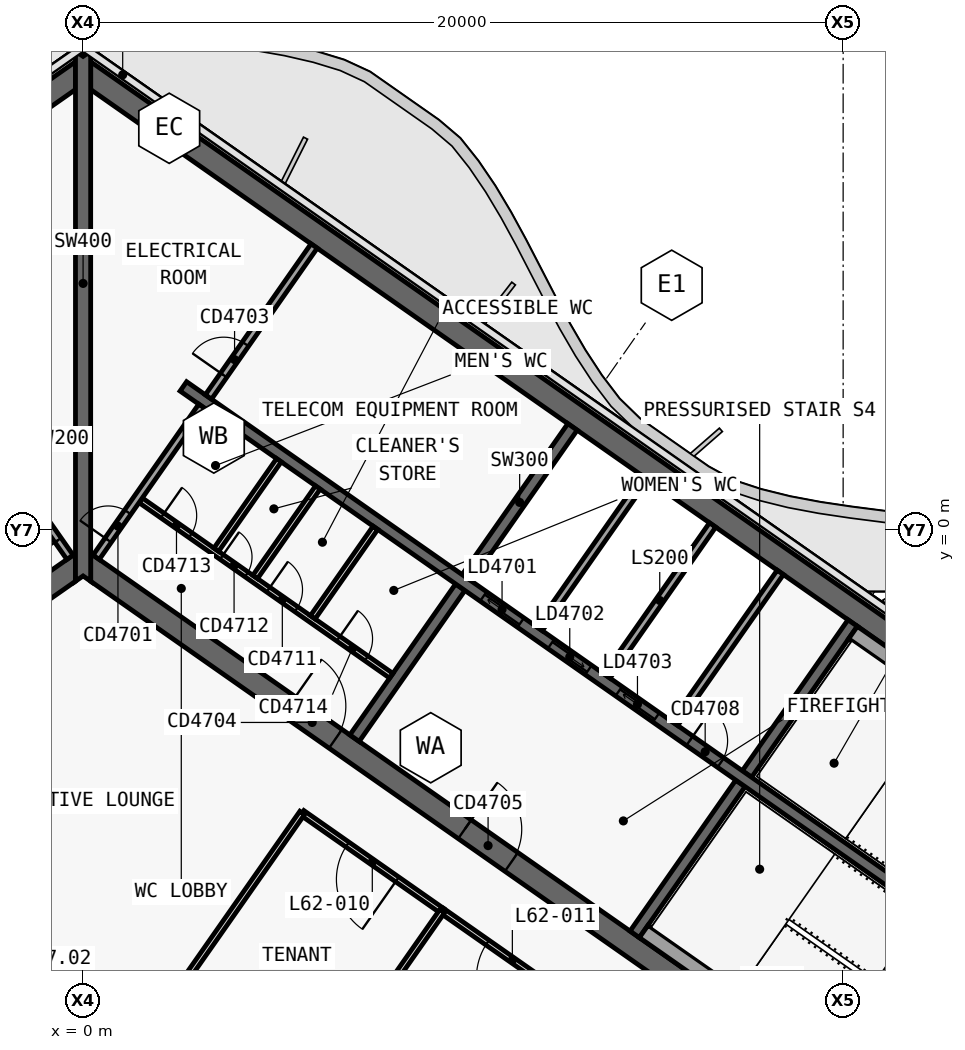
"""IFC4 building model, lengths in metres.
Left out: names, types, materials, properties, quantities, classifications, styles, units other than length and angle.
Written with IfcOpenShell. Run it as: python <this file> out.ifc"""

import sys

from ifc_helpers import new_model, si_unit, direction, frame, frame_2d, origin, place, context, subcontext, project, spatial, polyline, rectangle, outline, extrude, element, fill, save


model = new_model("IFC4")
c1 = context("Model", 3, precision=1e-05, world=origin(), true_north=direction((0.0, 1.0)))
c2 = subcontext(c1, "Body", "Model", "MODEL_VIEW")
j1 = project(units=[si_unit("LENGTHUNIT", "METRE"), si_unit("PLANEANGLEUNIT", "RADIAN")], contexts=[c1])
p1 = place(None, origin())
s1 = spatial("IfcSite", under=j1, at=p1, CompositionType="ELEMENT")
p2 = place(p1, origin())
s2 = spatial("IfcBuilding", under=s1, at=p2, CompositionType="ELEMENT")
p3 = place(p2, frame((0.0, 0.0, 264.4)))
s3 = spatial("IfcBuildingStorey", under=s2, at=p3, CompositionType="ELEMENT", Elevation=264.4)
p4 = place(p3, frame((-0.028, 12.066, 0.0), z_axis=(0.0, 0.0, 1.0), x_axis=(-0.819151382952, -0.573577380837, 0.0)))
e1 = element("IfcWall", 1, at=p4, inside=s3, PredefinedType="SHEAR", context=c2, shape_type="SweptSolid", body=[
    extrude(outline(polyline([(33.898, 0.3), (0.42, 0.3), (0.0, -0.3), (33.898, -0.3), (33.898, 0.3)])), origin(), (0.0, 0.0, 1.0), 3.9),
])
p5 = place(p3, frame((-0.028, -0.874, 0.0), z_axis=(0.0, 0.0, 1.0), x_axis=(-0.819150035022, -0.573579305871, 0.0)))
e2 = element("IfcWall", 2, at=p5, inside=s3, PredefinedType="SHEAR", context=c2, shape_type="SweptSolid", body=[
    extrude(outline(polyline([(26.476, 0.3), (0.42, 0.3), (0.0, -0.3), (26.476, -0.3), (26.476, 0.3)])), origin(), (0.0, 0.0, 1.0), 3.9),
])
p6 = place(p5, frame((2.976, 0.0, 0.0)))
e3 = element("IfcOpeningElement", 3, at=p6, cuts=e2, PredefinedType="OPENING", context=c2, shape_type="SweptSolid", body=[
    extrude(rectangle(XDim=2.4, YDim=2.1, at=frame_2d((1.2, 1.05))), frame((0.0, 0.31, 0.0), z_axis=(0.0, -1.0, 0.0), x_axis=(1.0, 0.0, 0.0)), (0.0, 0.0, 1.0), 0.62),
])
p7 = place(p5, frame((11.776, 0.0, 0.0)))
e4 = element("IfcOpeningElement", 4, at=p7, cuts=e2, PredefinedType="OPENING", context=c2, shape_type="SweptSolid", body=[
    extrude(rectangle(XDim=2.4, YDim=2.1, at=frame_2d((1.2, 1.05))), frame((0.0, 0.31, 0.0), z_axis=(0.0, -1.0, 0.0), x_axis=(1.0, 0.0, 0.0)), (0.0, 0.0, 1.0), 0.62),
])
p8 = place(p3, frame((0.028, 12.066, 0.0), z_axis=(0.0, 0.0, 1.0), x_axis=(0.819151382952, -0.573577380837, 0.0)))
e5 = element("IfcWall", 5, at=p8, inside=s3, PredefinedType="SHEAR", context=c2, shape_type="SweptSolid", body=[
    extrude(outline(polyline([(33.898, 0.3), (0.0, 0.3), (0.42, -0.3), (33.898, -0.3), (33.898, 0.3)])), origin(), (0.0, 0.0, 1.0), 3.9),
])
p9 = place(p3, frame((0.028, -0.874, 0.0), z_axis=(0.0, 0.0, 1.0), x_axis=(0.819150035022, -0.573579305871, 0.0)))
e6 = element("IfcWall", 6, at=p9, inside=s3, PredefinedType="SHEAR", context=c2, shape_type="SweptSolid", body=[
    extrude(outline(polyline([(26.476, 0.3), (0.0, 0.3), (0.42, -0.3), (26.476, -0.3), (26.476, 0.3)])), origin(), (0.0, 0.0, 1.0), 3.9),
])
p10 = place(p9, frame((6.576, 0.0, 0.0)))
e7 = element("IfcOpeningElement", 7, at=p10, cuts=e6, PredefinedType="OPENING", context=c2, shape_type="SweptSolid", body=[
    extrude(rectangle(XDim=1.5, YDim=2.1, at=frame_2d((0.75, 1.05))), frame((0.0, 0.31, 0.0), z_axis=(0.0, -1.0, 0.0), x_axis=(1.0, 0.0, 0.0)), (0.0, 0.0, 1.0), 0.62),
])
p11 = place(p9, frame((12.226, 0.0, 0.0)))
e8 = element("IfcOpeningElement", 8, at=p11, cuts=e6, PredefinedType="OPENING", context=c2, shape_type="SweptSolid", body=[
    extrude(rectangle(XDim=1.5, YDim=2.1, at=frame_2d((0.75, 1.05))), frame((0.0, 0.31, 0.0), z_axis=(0.0, -1.0, 0.0), x_axis=(1.0, 0.0, 0.0)), (0.0, 0.0, 1.0), 0.62),
])
p12 = place(p3, frame((7.143, -5.49, 0.0), z_axis=(0.0, 0.0, 1.0), x_axis=(0.573617744349, 0.819123118565, 0.0)))
e9 = element("IfcWall", 9, at=p12, inside=s3, PredefinedType="SHEAR", context=c2, shape_type="SweptSolid", body=[
    extrude(outline(polyline([(0.0, 0.15), (0.0, -0.15), (4.85, -0.15), (4.85, 0.15), (0.0, 0.15)])), origin(), (0.0, 0.0, 1.0), 3.9),
])
p13 = place(p3, frame((10.097, -1.271, 0.0), z_axis=(0.0, 0.0, 1.0), x_axis=(0.573560315113, 0.819163332265, 0.0)))
e10 = element("IfcWall", 10, at=p13, inside=s3, PredefinedType="SHEAR", context=c2, shape_type="SweptSolid", body=[
    extrude(outline(polyline([(4.85, -0.15), (4.85, 0.15), (0.0, 0.15), (0.0, -0.15), (4.85, -0.15)])), origin(), (0.0, 0.0, 1.0), 3.9),
])
p14 = place(p3, frame((14.515, -10.652, 0.0), z_axis=(0.0, 0.0, 1.0), x_axis=(0.573560315113, 0.819163332265, 0.0)))
e11 = element("IfcWall", 11, at=p14, inside=s3, PredefinedType="SHEAR", context=c2, shape_type="SweptSolid", body=[
    extrude(outline(polyline([(0.0, 0.15), (0.0, -0.15), (4.85, -0.15), (4.85, 0.15), (0.0, 0.15)])), origin(), (0.0, 0.0, 1.0), 3.9),
])
p15 = place(p3, frame((17.469, -6.433, 0.0), z_axis=(0.0, 0.0, 1.0), x_axis=(0.573594092424, 0.81913968109, 0.0)))
e12 = element("IfcWall", 12, at=p15, inside=s3, PredefinedType="SHEAR", context=c2, shape_type="SweptSolid", body=[
    extrude(outline(polyline([(4.85, -0.15), (4.85, 0.15), (0.0, 0.15), (0.0, -0.15), (4.85, -0.15)])), origin(), (0.0, 0.0, 1.0), 3.9),
])
p16 = place(p3, frame((2.638, 3.768, 0.0), z_axis=(0.0, 0.0, 1.0), x_axis=(0.819155014212, -0.573572194837, 0.0)))
e13 = element("IfcWall", 13, at=p16, inside=s3, PredefinedType="SHEAR", context=c2, shape_type="SweptSolid", body=[
    extrude(outline(polyline([(0.0, 0.15), (0.0, -0.15), (26.4, -0.15), (26.4, 0.15), (0.0, 0.15)])), origin(), (0.0, 0.0, 1.0), 3.9),
])
p17 = place(p16, frame((9.637, 0.0, 0.0)))
e14 = element("IfcOpeningElement", 14, at=p17, cuts=e13, PredefinedType="OPENING", context=c2, shape_type="SweptSolid", body=[
    extrude(rectangle(XDim=1.2, YDim=2.1, at=frame_2d((0.6, 1.05))), frame((0.0, 0.16, 0.0), z_axis=(0.0, -1.0, 0.0), x_axis=(1.0, 0.0, 0.0)), (0.0, 0.0, 1.0), 0.32),
])
p18 = place(p16, frame((11.812, 0.0, 0.0)))
e15 = element("IfcOpeningElement", 15, at=p18, cuts=e13, PredefinedType="OPENING", context=c2, shape_type="SweptSolid", body=[
    extrude(rectangle(XDim=1.2, YDim=2.1, at=frame_2d((0.6, 1.05))), frame((0.0, 0.16, 0.0), z_axis=(0.0, -1.0, 0.0), x_axis=(1.0, 0.0, 0.0)), (0.0, 0.0, 1.0), 0.32),
])
p19 = place(p16, frame((13.988, 0.0, 0.0)))
e16 = element("IfcOpeningElement", 16, at=p19, cuts=e13, PredefinedType="OPENING", context=c2, shape_type="SweptSolid", body=[
    extrude(rectangle(XDim=1.2, YDim=2.1, at=frame_2d((0.6, 1.05))), frame((0.0, 0.16, 0.0), z_axis=(0.0, -1.0, 0.0), x_axis=(1.0, 0.0, 0.0)), (0.0, 0.0, 1.0), 0.32),
])
p20 = place(p16, frame((16.262, 0.0, 0.0)))
e17 = element("IfcOpeningElement", 17, at=p20, cuts=e13, PredefinedType="OPENING", context=c2, shape_type="SweptSolid", body=[
    extrude(rectangle(XDim=1.0, YDim=2.1, at=frame_2d((0.5, 1.05))), frame((0.0, 0.16, 0.0), z_axis=(0.0, -1.0, 0.0), x_axis=(1.0, 0.0, 0.0)), (0.0, 0.0, 1.0), 0.32),
])
p21 = place(p3, frame((0.0, -1.361, 0.0), z_axis=(0.0, 0.0, 1.0), x_axis=(0.0, 1.0, 0.0)))
e18 = element("IfcWall", 18, at=p21, inside=s3, PredefinedType="SHEAR", context=c2, shape_type="SweptSolid", body=[
    extrude(outline(polyline([(0.14, 0.2), (0.0, 0.2), (0.14, 0.0), (0.0, -0.2), (0.14, -0.2), (1.012, -0.2), (12.94, -0.2), (13.813, -0.2), (13.893, -0.2), (13.933, -0.172), (13.813, 0.0), (13.933, 0.172), (13.893, 0.2), (13.813, 0.2), (12.94, 0.2), (1.012, 0.2), (0.14, 0.2)])), origin(), (0.0, 0.0, 1.0), 3.9),
])
p22 = place(p3, frame((12.001, -2.605, 0.0), z_axis=(0.0, 0.0, 1.0), x_axis=(0.573560315113, 0.819163332265, 0.0)))
e19 = element("IfcWall", 19, at=p22, inside=s3, PredefinedType="SOLIDWALL", context=c2, shape_type="SweptSolid", body=[
    extrude(rectangle(XDim=4.85, YDim=0.2, at=frame_2d((2.425, 0.0))), origin(), (0.0, 0.0, 1.0), 3.9),
])
p23 = place(p3, frame((13.783, -3.852, 0.0), z_axis=(0.0, 0.0, 1.0), x_axis=(0.573594092424, 0.81913968109, 0.0)))
e20 = element("IfcWall", 20, at=p23, inside=s3, PredefinedType="SOLIDWALL", context=c2, shape_type="SweptSolid", body=[
    extrude(rectangle(XDim=4.85, YDim=0.2, at=frame_2d((2.425, 0.0))), origin(), (0.0, 0.0, 1.0), 3.9),
])
p24 = place(p3, frame((15.565, -5.1, 0.0), z_axis=(0.0, 0.0, 1.0), x_axis=(0.573560315113, 0.819163332265, 0.0)))
e21 = element("IfcWall", 21, at=p24, inside=s3, PredefinedType="SOLIDWALL", context=c2, shape_type="SweptSolid", body=[
    extrude(rectangle(XDim=4.85, YDim=0.2, at=frame_2d((2.425, 0.0))), origin(), (0.0, 0.0, 1.0), 3.9),
])
p25 = place(p3, frame((1.516, 0.77, 0.0), z_axis=(0.0, 0.0, 1.0), x_axis=(0.819146424436, -0.573584462249, 0.0)))
e22 = element("IfcWall", 22, at=p25, inside=s3, PredefinedType="PARTITIONING", context=c2, shape_type="SweptSolid", body=[
    extrude(rectangle(XDim=8.05, YDim=0.15, at=frame_2d((4.025, 0.0))), origin(), (0.0, 0.0, 1.0), 3.62),
])
p26 = place(p25, frame((0.7, 0.0, 0.0)))
e23 = element("IfcOpeningElement", 23, at=p26, cuts=e22, PredefinedType="OPENING", context=c2, shape_type="SweptSolid", body=[
    extrude(rectangle(XDim=0.9, YDim=2.1, at=frame_2d((0.45, 1.05))), frame((0.0, 0.085, 0.0), z_axis=(0.0, -1.0, 0.0), x_axis=(1.0, 0.0, 0.0)), (0.0, 0.0, 1.0), 0.17),
])
p27 = place(p25, frame((2.6, 0.0, 0.0)))
e24 = element("IfcOpeningElement", 24, at=p27, cuts=e22, PredefinedType="OPENING", context=c2, shape_type="SweptSolid", body=[
    extrude(rectangle(XDim=0.8, YDim=2.1, at=frame_2d((0.4, 1.05))), frame((0.0, 0.085, 0.0), z_axis=(0.0, -1.0, 0.0), x_axis=(1.0, 0.0, 0.0)), (0.0, 0.0, 1.0), 0.17),
])
p28 = place(p25, frame((4.1, 0.0, 0.0)))
e25 = element("IfcOpeningElement", 25, at=p28, cuts=e22, PredefinedType="OPENING", context=c2, shape_type="SweptSolid", body=[
    extrude(rectangle(XDim=0.9, YDim=2.1, at=frame_2d((0.45, 1.05))), frame((0.0, 0.085, 0.0), z_axis=(0.0, -1.0, 0.0), x_axis=(1.0, 0.0, 0.0)), (0.0, 0.0, 1.0), 0.17),
])
p29 = place(p25, frame((6.35, 0.0, 0.0)))
e26 = element("IfcOpeningElement", 26, at=p29, cuts=e22, PredefinedType="OPENING", context=c2, shape_type="SweptSolid", body=[
    extrude(rectangle(XDim=0.9, YDim=2.1, at=frame_2d((0.45, 1.05))), frame((0.0, 0.085, 0.0), z_axis=(0.0, -1.0, 0.0), x_axis=(1.0, 0.0, 0.0)), (0.0, 0.0, 1.0), 0.17),
])
p30 = place(p3, frame((3.504, -0.531, 0.0), z_axis=(0.0, 0.0, 1.0), x_axis=(0.573582013179, 0.819148139324, 0.0)))
e27 = element("IfcWall", 27, at=p30, inside=s3, PredefinedType="PARTITIONING", context=c2, shape_type="SweptSolid", body=[
    extrude(rectangle(XDim=2.875, YDim=0.15, at=frame_2d((1.438, 0.0))), origin(), (0.0, 0.0, 1.0), 3.62),
])
p31 = place(p3, frame((4.528, -1.248, 0.0), z_axis=(0.0, 0.0, 1.0), x_axis=(0.573621911162, 0.819120200602, 0.0)))
e28 = element("IfcWall", 28, at=p31, inside=s3, PredefinedType="PARTITIONING", context=c2, shape_type="SweptSolid", body=[
    extrude(rectangle(XDim=2.875, YDim=0.15, at=frame_2d((1.438, 0.0))), origin(), (0.0, 0.0, 1.0), 3.62),
])
p32 = place(p3, frame((6.044, -2.309, 0.0), z_axis=(0.0, 0.0, 1.0), x_axis=(0.573564930514, 0.819160100642, 0.0)))
e29 = element("IfcWall", 29, at=p32, inside=s3, PredefinedType="PARTITIONING", context=c2, shape_type="SweptSolid", body=[
    extrude(rectangle(XDim=2.875, YDim=0.15, at=frame_2d((1.438, 0.0))), origin(), (0.0, 0.0, 1.0), 3.62),
])
p33 = place(p3, frame((20.259, -2.71, 0.0), z_axis=(0.0, 0.0, 1.0), x_axis=(0.81914849389, -0.573581506813, 0.0)))
e30 = element("IfcWall", 30, at=p33, inside=s3, PredefinedType="SOLIDWALL", context=c2, shape_type="SweptSolid", body=[
    extrude(rectangle(XDim=8.25, YDim=0.4, at=frame_2d((4.125, 0.0))), origin(), (0.0, 0.0, 1.0), 3.62),
])
p34 = place(p3, frame((14.753, -10.574, 0.0), z_axis=(0.0, 0.0, 1.0), x_axis=(0.819158229677, -0.573567602601, 0.0)))
e31 = element("IfcWall", 31, at=p34, inside=s3, PredefinedType="SOLIDWALL", context=c2, shape_type="SweptSolid", body=[
    extrude(rectangle(XDim=8.25, YDim=0.4, at=frame_2d((4.125, 0.0))), origin(), (0.0, 0.0, 1.0), 3.62),
])
p35 = place(p3, frame((-0.344, -0.729, 0.0), z_axis=(0.0, 0.0, 1.0), x_axis=(-0.573560315113, 0.819163332265, 0.0)))
e32 = element("IfcWall", 32, at=p35, inside=s3, PredefinedType="SOLIDWALL", context=c2, shape_type="SweptSolid", body=[
    extrude(rectangle(XDim=4.85, YDim=0.2, at=frame_2d((2.425, 0.0))), origin(), (0.0, 0.0, 1.0), 3.62),
])
p36 = place(p35, frame((0.55, 0.0, 0.0)))
e33 = element("IfcOpeningElement", 33, at=p36, cuts=e32, PredefinedType="OPENING", context=c2, shape_type="SweptSolid", body=[
    extrude(rectangle(XDim=0.9, YDim=2.1, at=frame_2d((0.45, 1.05))), frame((0.0, 0.11, 0.0), z_axis=(0.0, -1.0, 0.0), x_axis=(1.0, 0.0, 0.0)), (0.0, 0.0, 1.0), 0.22),
])
p37 = place(p3, frame((0.344, -0.729, 0.0), z_axis=(0.0, 0.0, 1.0), x_axis=(0.573560315113, 0.819163332265, 0.0)))
e34 = element("IfcWall", 34, at=p37, inside=s3, PredefinedType="SOLIDWALL", context=c2, shape_type="SweptSolid", body=[
    extrude(rectangle(XDim=4.85, YDim=0.2, at=frame_2d((2.425, 0.0))), origin(), (0.0, 0.0, 1.0), 3.62),
])
p38 = place(p37, frame((0.55, 0.0, 0.0)))
e35 = element("IfcOpeningElement", 35, at=p38, cuts=e34, PredefinedType="OPENING", context=c2, shape_type="SweptSolid", body=[
    extrude(rectangle(XDim=0.9, YDim=2.1, at=frame_2d((0.45, 1.05))), frame((0.0, 0.11, 0.0), z_axis=(0.0, -1.0, 0.0), x_axis=(1.0, 0.0, 0.0)), (0.0, 0.0, 1.0), 0.22),
])
p39 = place(p3, frame((3.298, 3.49, 0.0), z_axis=(0.0, 0.0, 1.0), x_axis=(0.573560315113, 0.819163332265, 0.0)))
e36 = element("IfcWall", 36, at=p39, inside=s3, PredefinedType="SOLIDWALL", context=c2, shape_type="SweptSolid", body=[
    extrude(rectangle(XDim=4.85, YDim=0.2, at=frame_2d((2.425, 0.0))), origin(), (0.0, 0.0, 1.0), 3.62),
])
p40 = place(p39, frame((0.7, 0.0, 0.0)))
e37 = element("IfcOpeningElement", 37, at=p40, cuts=e36, PredefinedType="OPENING", context=c2, shape_type="SweptSolid", body=[
    extrude(rectangle(XDim=1.0, YDim=2.1, at=frame_2d((0.5, 1.05))), frame((0.0, 0.11, 0.0), z_axis=(0.0, -1.0, 0.0), x_axis=(1.0, 0.0, 0.0)), (0.0, 0.0, 1.0), 0.22),
])
p41 = place(p3, frame((9.454, -10.038, 0.0), z_axis=(0.0, 0.0, 1.0), x_axis=(-0.819142740634, 0.573589723117, 0.0)))
e38 = element("IfcWall", 38, at=p41, inside=s3, PredefinedType="PARTITIONING", context=c2, shape_type="SweptSolid", body=[
    extrude(rectangle(XDim=4.502, YDim=0.15, at=frame_2d((2.251, 0.0))), origin(), (0.0, 0.0, 1.0), 3.05),
])
p42 = place(p41, frame((1.451, 0.0, 0.0)))
e39 = element("IfcOpeningElement", 39, at=p42, cuts=e38, PredefinedType="OPENING", context=c2, shape_type="SweptSolid", body=[
    extrude(rectangle(XDim=1.6, YDim=2.1, at=frame_2d((0.8, 1.05))), frame((0.0, 0.085, 0.0), z_axis=(0.0, -1.0, 0.0), x_axis=(1.0, 0.0, 0.0)), (0.0, 0.0, 1.0), 0.17),
])
p43 = place(p3, frame((13.14, -12.619, 0.0), z_axis=(0.0, 0.0, 1.0), x_axis=(-0.819165703328, 0.573556928727, 0.0)))
e40 = element("IfcWall", 40, at=p43, inside=s3, PredefinedType="PARTITIONING", context=c2, shape_type="SweptSolid", body=[
    extrude(rectangle(XDim=4.504, YDim=0.15, at=frame_2d((2.252, 0.0))), origin(), (0.0, 0.0, 1.0), 3.05),
])
p44 = place(p43, frame((1.452, 0.0, 0.0)))
e41 = element("IfcOpeningElement", 41, at=p44, cuts=e40, PredefinedType="OPENING", context=c2, shape_type="SweptSolid", body=[
    extrude(rectangle(XDim=1.6, YDim=2.1, at=frame_2d((0.8, 1.05))), frame((0.0, 0.085, 0.0), z_axis=(0.0, -1.0, 0.0), x_axis=(1.0, 0.0, 0.0)), (0.0, 0.0, 1.0), 0.17),
])
p45 = place(p3, frame((9.452, -10.037, 0.0), z_axis=(0.0, 0.0, 1.0), x_axis=(-0.573575945067, -0.81915238829, 0.0)))
e42 = element("IfcWall", 42, at=p45, inside=s3, PredefinedType="PARTITIONING", context=c2, shape_type="SweptSolid", body=[
    extrude(rectangle(XDim=7.5, YDim=0.15, at=frame_2d((3.75, 0.0))), origin(), (0.0, 0.0, 1.0), 3.0),
])
p46 = place(p3, frame((1.849, -13.051, 0.0), z_axis=(0.0, 0.0, 1.0), x_axis=(0.573577493031, 0.819151304393, 0.0)))
e43 = element("IfcWall", 43, at=p46, inside=s3, PredefinedType="PARTITIONING", context=c2, shape_type="SweptSolid", body=[
    extrude(rectangle(XDim=6.83, YDim=0.15, at=frame_2d((3.415, 0.0))), origin(), (0.0, 0.0, 1.0), 3.05),
])
p47 = place(p17, origin())
e44 = element("IfcDoor", 44, at=p47, inside=s3, OperationType="SLIDING_TO_LEFT", PredefinedType="DOOR", context=c2, shape_type="SweptSolid", body=[
    extrude(rectangle(XDim=1.2, YDim=2.1, at=frame_2d((0.6, 1.05))), frame((0.0, 0.025, 0.0), z_axis=(0.0, -1.0, 0.0), x_axis=(1.0, 0.0, 0.0)), (0.0, 0.0, 1.0), 0.05),
])
fill(e14, e44)
p48 = place(p18, origin())
e45 = element("IfcDoor", 45, at=p48, inside=s3, OperationType="SLIDING_TO_RIGHT", PredefinedType="DOOR", context=c2, shape_type="SweptSolid", body=[
    extrude(rectangle(XDim=1.2, YDim=2.1, at=frame_2d((0.6, 1.05))), frame((0.0, 0.025, 0.0), z_axis=(0.0, -1.0, 0.0), x_axis=(1.0, 0.0, 0.0)), (0.0, 0.0, 1.0), 0.05),
])
fill(e15, e45)
p49 = place(p19, origin())
e46 = element("IfcDoor", 46, at=p49, inside=s3, OperationType="SLIDING_TO_LEFT", PredefinedType="DOOR", context=c2, shape_type="SweptSolid", body=[
    extrude(rectangle(XDim=1.2, YDim=2.1, at=frame_2d((0.6, 1.05))), frame((0.0, 0.025, 0.0), z_axis=(0.0, -1.0, 0.0), x_axis=(1.0, 0.0, 0.0)), (0.0, 0.0, 1.0), 0.05),
])
fill(e16, e46)
p50 = place(p20, origin())
e47 = element("IfcDoor", 47, at=p50, inside=s3, OperationType="SINGLE_SWING_RIGHT", PredefinedType="DOOR", context=c2, shape_type="SweptSolid", body=[
    extrude(rectangle(XDim=1.0, YDim=2.1, at=frame_2d((0.5, 1.05))), frame((0.0, 0.025, 0.0), z_axis=(0.0, -1.0, 0.0), x_axis=(1.0, 0.0, 0.0)), (0.0, 0.0, 1.0), 0.05),
])
fill(e17, e47)
p51 = place(p26, origin())
e48 = element("IfcDoor", 48, at=p51, inside=s3, OperationType="SINGLE_SWING_RIGHT", PredefinedType="DOOR", context=c2, shape_type="SweptSolid", body=[
    extrude(rectangle(XDim=0.9, YDim=2.1, at=frame_2d((0.45, 1.05))), frame((0.0, 0.025, 0.0), z_axis=(0.0, -1.0, 0.0), x_axis=(1.0, 0.0, 0.0)), (0.0, 0.0, 1.0), 0.05),
])
fill(e23, e48)
p52 = place(p27, origin())
e49 = element("IfcDoor", 49, at=p52, inside=s3, OperationType="SINGLE_SWING_RIGHT", PredefinedType="DOOR", context=c2, shape_type="SweptSolid", body=[
    extrude(rectangle(XDim=0.8, YDim=2.1, at=frame_2d((0.4, 1.05))), frame((0.0, 0.025, 0.0), z_axis=(0.0, -1.0, 0.0), x_axis=(1.0, 0.0, 0.0)), (0.0, 0.0, 1.0), 0.05),
])
fill(e24, e49)
p53 = place(p28, origin())
e50 = element("IfcDoor", 50, at=p53, inside=s3, OperationType="SINGLE_SWING_RIGHT", PredefinedType="DOOR", context=c2, shape_type="SweptSolid", body=[
    extrude(rectangle(XDim=0.9, YDim=2.1, at=frame_2d((0.45, 1.05))), frame((0.0, 0.025, 0.0), z_axis=(0.0, -1.0, 0.0), x_axis=(1.0, 0.0, 0.0)), (0.0, 0.0, 1.0), 0.05),
])
fill(e25, e50)
p54 = place(p29, origin())
e51 = element("IfcDoor", 51, at=p54, inside=s3, OperationType="SINGLE_SWING_RIGHT", PredefinedType="DOOR", context=c2, shape_type="SweptSolid", body=[
    extrude(rectangle(XDim=0.9, YDim=2.1, at=frame_2d((0.45, 1.05))), frame((0.0, 0.025, 0.0), z_axis=(0.0, -1.0, 0.0), x_axis=(1.0, 0.0, 0.0)), (0.0, 0.0, 1.0), 0.05),
])
fill(e26, e51)
p55 = place(p10, origin())
e52 = element("IfcDoor", 52, at=p55, inside=s3, OperationType="SINGLE_SWING_RIGHT", PredefinedType="DOOR", context=c2, shape_type="SweptSolid", body=[
    extrude(rectangle(XDim=1.5, YDim=2.1, at=frame_2d((0.75, 1.05))), frame((0.0, 0.025, 0.0), z_axis=(0.0, -1.0, 0.0), x_axis=(1.0, 0.0, 0.0)), (0.0, 0.0, 1.0), 0.05),
])
fill(e7, e52)
p56 = place(p11, origin())
e53 = element("IfcDoor", 53, at=p56, inside=s3, OperationType="DOUBLE_DOOR_SINGLE_SWING", PredefinedType="DOOR", context=c2, shape_type="SweptSolid", body=[
    extrude(rectangle(XDim=1.5, YDim=2.1, at=frame_2d((0.75, 1.05))), frame((0.0, 0.025, 0.0), z_axis=(0.0, -1.0, 0.0), x_axis=(1.0, 0.0, 0.0)), (0.0, 0.0, 1.0), 0.05),
])
fill(e8, e53)
p57 = place(p36, origin())
e54 = element("IfcDoor", 54, at=p57, inside=s3, OperationType="SINGLE_SWING_RIGHT", PredefinedType="DOOR", context=c2, shape_type="SweptSolid", body=[
    extrude(rectangle(XDim=0.9, YDim=2.1, at=frame_2d((0.45, 1.05))), frame((0.0, 0.025, 0.0), z_axis=(0.0, -1.0, 0.0), x_axis=(1.0, 0.0, 0.0)), (0.0, 0.0, 1.0), 0.05),
])
fill(e33, e54)
p58 = place(p38, origin())
e55 = element("IfcDoor", 55, at=p58, inside=s3, OperationType="SINGLE_SWING_RIGHT", PredefinedType="DOOR", context=c2, shape_type="SweptSolid", body=[
    extrude(rectangle(XDim=0.9, YDim=2.1, at=frame_2d((0.45, 1.05))), frame((0.0, 0.025, 0.0), z_axis=(0.0, -1.0, 0.0), x_axis=(1.0, 0.0, 0.0)), (0.0, 0.0, 1.0), 0.05),
])
fill(e35, e55)
p59 = place(p40, origin())
e56 = element("IfcDoor", 56, at=p59, inside=s3, OperationType="SINGLE_SWING_RIGHT", PredefinedType="DOOR", context=c2, shape_type="SweptSolid", body=[
    extrude(rectangle(XDim=1.0, YDim=2.1, at=frame_2d((0.5, 1.05))), frame((0.0, 0.025, 0.0), z_axis=(0.0, -1.0, 0.0), x_axis=(1.0, 0.0, 0.0)), (0.0, 0.0, 1.0), 0.05),
])
fill(e37, e56)
p60 = place(p42, origin())
e57 = element("IfcDoor", 57, at=p60, inside=s3, OperationType="DOUBLE_DOOR_SINGLE_SWING", PredefinedType="DOOR", context=c2, shape_type="SweptSolid", body=[
    extrude(rectangle(XDim=1.6, YDim=2.1, at=frame_2d((0.8, 1.05))), frame((0.0, 0.025, 0.0), z_axis=(0.0, -1.0, 0.0), x_axis=(1.0, 0.0, 0.0)), (0.0, 0.0, 1.0), 0.05),
])
fill(e39, e57)
p61 = place(p44, origin())
e58 = element("IfcDoor", 58, at=p61, inside=s3, OperationType="DOUBLE_DOOR_SINGLE_SWING", PredefinedType="DOOR", context=c2, shape_type="SweptSolid", body=[
    extrude(rectangle(XDim=1.6, YDim=2.1, at=frame_2d((0.8, 1.05))), frame((0.0, 0.025, 0.0), z_axis=(0.0, -1.0, 0.0), x_axis=(1.0, 0.0, 0.0)), (0.0, 0.0, 1.0), 0.05),
])
fill(e41, e58)
save(model, sys.argv[1])
